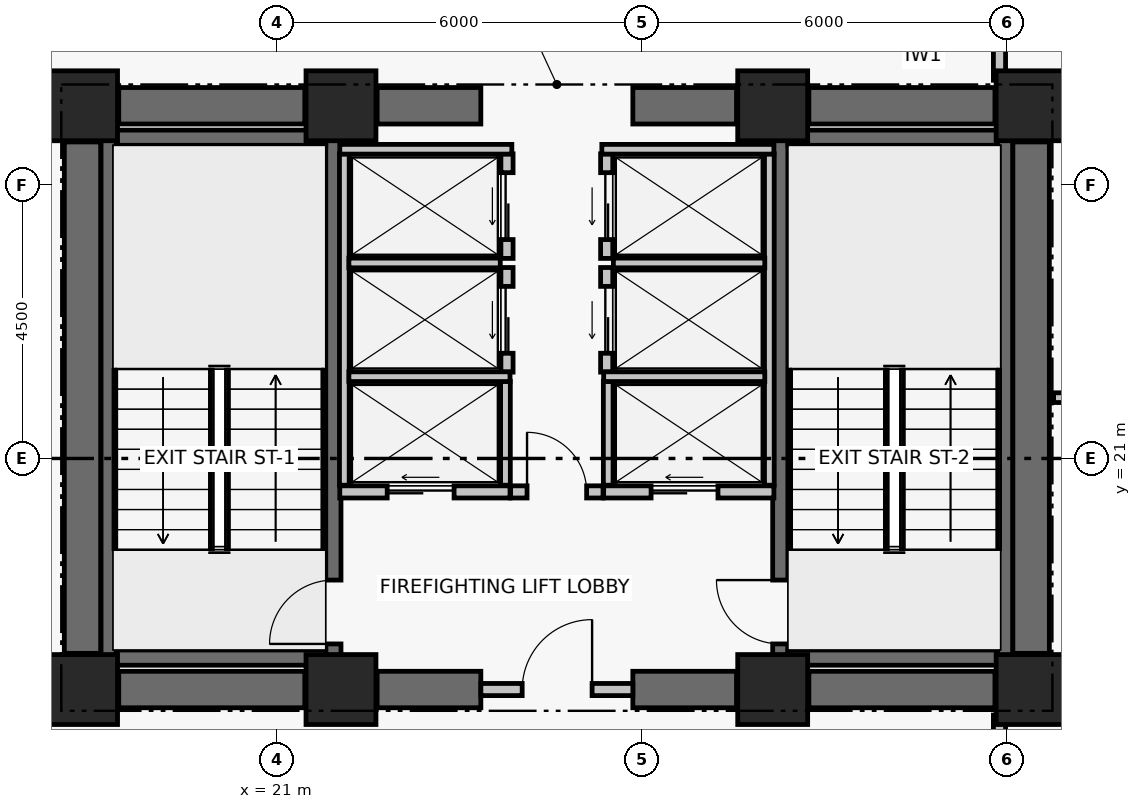
"""IFC4 building model, lengths in metres.
Left out: names, types, materials, properties, quantities, classifications, styles, units other than length and angle.
Written with IfcOpenShell. Run it as: python <this file> out.ifc"""

import sys

from ifc_helpers import new_model, si_unit, direction, frame, frame_2d, origin, origin_2d, place, context, subcontext, project, spatial, rectangle, extrude, element, fill, save


model = new_model("IFC4")
c1 = context("Model", 3, precision=1e-05, world=origin(), true_north=direction((0.0, 1.0)))
c2 = subcontext(c1, "Body", "Model", "MODEL_VIEW")
j1 = project(units=[si_unit("LENGTHUNIT", "METRE"), si_unit("PLANEANGLEUNIT", "RADIAN")], contexts=[c1])
p1 = place(None, origin())
s1 = spatial("IfcSite", under=j1, at=p1, CompositionType="ELEMENT")
p2 = place(p1, origin())
s2 = spatial("IfcBuilding", under=s1, at=p2, CompositionType="ELEMENT")
p3 = place(p2, frame((0.0, 0.0, 83.4)))
s3 = spatial("IfcBuildingStorey", under=s2, at=p3, CompositionType="ELEMENT", Elevation=83.4)
for number, where, z_axis, x_axis in (
    (1, (17.8, 17.2, 0.0), (0.0, 0.0, 1.0), (1.0, 0.0, 0.0)),
    (2, (22.05, 17.2, 0.0), (0.0, 0.0, 1.0), (1.0, 0.0, 0.0)),
    (3, (29.15, 17.2, 0.0), (0.0, 0.0, 1.0), (1.0, 0.0, 0.0)),
    (4, (33.4, 17.2, 0.0), (0.0, 0.0, 1.0), (1.0, 0.0, 0.0)),
    (5, (17.8, 26.8, 0.0), (0.0, 0.0, 1.0), (1.0, 0.0, 0.0)),
    (6, (22.05, 26.8, 0.0), (0.0, 0.0, 1.0), (1.0, 0.0, 0.0)),
    (7, (29.15, 26.8, 0.0), (0.0, 0.0, 1.0), (1.0, 0.0, 0.0)),
    (8, (33.4, 26.8, 0.0), (0.0, 0.0, 1.0), (1.0, 0.0, 0.0)),
):
    element("IfcColumn", number, at=place(p3, frame(where, z_axis=z_axis, x_axis=x_axis)), inside=s3, PredefinedType="COLUMN", context=c2, shape_type="SweptSolid", body=[
        extrude(rectangle(XDim=1.15, YDim=1.15, at=origin_2d()), origin(), (0.0, 0.0, 1.0), 5.7),
    ])
p4 = place(p3, frame((18.395, 17.2, 0.0), z_axis=(0.0, 0.0, 1.0), x_axis=(1.0, 0.0, 0.0)))
e9 = element("IfcWall", 9, at=p4, inside=s3, PredefinedType="SHEAR", context=c2, shape_type="SweptSolid", body=[
    extrude(rectangle(XDim=3.06, YDim=0.6, at=frame_2d((1.53, 0.0))), origin(), (0.0, 0.0, 1.0), 5.45),
])
p5 = place(p3, frame((22.645, 17.2, 0.0), z_axis=(0.0, 0.0, 1.0), x_axis=(1.0, 0.0, 0.0)))
e10 = element("IfcWall", 10, at=p5, inside=s3, PredefinedType="SHEAR", context=c2, shape_type="SweptSolid", body=[
    extrude(rectangle(XDim=1.705, YDim=0.6, at=frame_2d((0.853, 0.0))), origin(), (0.0, 0.0, 1.0), 5.45),
])
p6 = place(p3, frame((26.85, 17.2, 0.0), z_axis=(0.0, 0.0, 1.0), x_axis=(1.0, 0.0, 0.0)))
e11 = element("IfcWall", 11, at=p6, inside=s3, PredefinedType="SHEAR", context=c2, shape_type="SweptSolid", body=[
    extrude(rectangle(XDim=1.705, YDim=0.6, at=frame_2d((0.853, 0.0))), origin(), (0.0, 0.0, 1.0), 5.45),
])
p7 = place(p3, frame((29.745, 17.2, 0.0), z_axis=(0.0, 0.0, 1.0), x_axis=(1.0, 0.0, 0.0)))
e12 = element("IfcWall", 12, at=p7, inside=s3, PredefinedType="SHEAR", context=c2, shape_type="SweptSolid", body=[
    extrude(rectangle(XDim=3.06, YDim=0.6, at=frame_2d((1.53, 0.0))), origin(), (0.0, 0.0, 1.0), 5.45),
])
p8 = place(p3, frame((18.395, 26.8, 0.0), z_axis=(0.0, 0.0, 1.0), x_axis=(1.0, 0.0, 0.0)))
e13 = element("IfcWall", 13, at=p8, inside=s3, PredefinedType="SHEAR", context=c2, shape_type="SweptSolid", body=[
    extrude(rectangle(XDim=3.06, YDim=0.6, at=frame_2d((1.53, 0.0))), origin(), (0.0, 0.0, 1.0), 5.45),
])
p9 = place(p3, frame((22.645, 26.8, 0.0), z_axis=(0.0, 0.0, 1.0), x_axis=(1.0, 0.0, 0.0)))
e14 = element("IfcWall", 14, at=p9, inside=s3, PredefinedType="SHEAR", context=c2, shape_type="SweptSolid", body=[
    extrude(rectangle(XDim=1.705, YDim=0.6, at=frame_2d((0.853, 0.0))), origin(), (0.0, 0.0, 1.0), 5.45),
])
p10 = place(p3, frame((26.85, 26.8, 0.0), z_axis=(0.0, 0.0, 1.0), x_axis=(1.0, 0.0, 0.0)))
e15 = element("IfcWall", 15, at=p10, inside=s3, PredefinedType="SHEAR", context=c2, shape_type="SweptSolid", body=[
    extrude(rectangle(XDim=1.705, YDim=0.6, at=frame_2d((0.853, 0.0))), origin(), (0.0, 0.0, 1.0), 5.45),
])
p11 = place(p3, frame((29.745, 26.8, 0.0), z_axis=(0.0, 0.0, 1.0), x_axis=(1.0, 0.0, 0.0)))
e16 = element("IfcWall", 16, at=p11, inside=s3, PredefinedType="SHEAR", context=c2, shape_type="SweptSolid", body=[
    extrude(rectangle(XDim=3.06, YDim=0.6, at=frame_2d((1.53, 0.0))), origin(), (0.0, 0.0, 1.0), 5.45),
])
for number, where, z_axis, x_axis in (
    (17, (17.8, 17.795, 0.0), (0.0, 0.0, 1.0), (0.0, 1.0, 0.0)),
    (18, (33.4, 17.795, 0.0), (0.0, 0.0, 1.0), (0.0, 1.0, 0.0)),
):
    element("IfcWall", number, at=place(p3, frame(where, z_axis=z_axis, x_axis=x_axis)), inside=s3, PredefinedType="SHEAR", context=c2, shape_type="SweptSolid", body=[
        extrude(rectangle(XDim=8.41, YDim=0.6, at=frame_2d((4.205, 0.0))), origin(), (0.0, 0.0, 1.0), 5.45),
    ])
p12 = place(p3, frame((18.229, 17.6, 0.0), z_axis=(0.0, 0.0, 1.0), x_axis=(0.0, 1.0, 0.0)))
e19 = element("IfcWall", 19, at=p12, inside=s3, PredefinedType="SHEAR", context=c2, shape_type="SweptSolid", body=[
    extrude(rectangle(XDim=8.8, YDim=0.25, at=frame_2d((4.4, 0.0))), origin(), (0.0, 0.0, 1.0), 5.45),
])
p13 = place(p3, frame((21.925, 17.6, 0.0), z_axis=(0.0, 0.0, 1.0), x_axis=(0.0, 1.0, 0.0)))
e20 = element("IfcWall", 20, at=p13, inside=s3, PredefinedType="SHEAR", context=c2, shape_type="SweptSolid", body=[
    extrude(rectangle(XDim=8.8, YDim=0.25, at=frame_2d((4.4, 0.0))), origin(), (0.0, 0.0, 1.0), 5.45),
])
p14 = place(p13, frame((0.35, 0.0, 0.0)))
e21 = element("IfcOpeningElement", 21, at=p14, cuts=e20, PredefinedType="OPENING", context=c2, shape_type="SweptSolid", body=[
    extrude(rectangle(XDim=1.05, YDim=2.08, at=frame_2d((0.525, 1.04))), frame((0.0, 0.135, 0.0), z_axis=(0.0, -1.0, 0.0), x_axis=(1.0, 0.0, 0.0)), (0.0, 0.0, 1.0), 0.27),
])
for number, where, z_axis, x_axis in (
    (22, (18.354, 17.725, 0.0), (0.0, 0.0, 1.0), (1.0, 0.0, 0.0)),
    (23, (18.354, 26.275, 0.0), (0.0, 0.0, 1.0), (1.0, 0.0, 0.0)),
):
    element("IfcWall", number, at=place(p3, frame(where, z_axis=z_axis, x_axis=x_axis)), inside=s3, PredefinedType="SHEAR", context=c2, shape_type="SweptSolid", body=[
        extrude(rectangle(XDim=3.446, YDim=0.25, at=frame_2d((1.723, 0.0))), origin(), (0.0, 0.0, 1.0), 5.45),
    ])
p15 = place(p3, frame((29.275, 17.6, 0.0), z_axis=(0.0, 0.0, 1.0), x_axis=(0.0, 1.0, 0.0)))
e24 = element("IfcWall", 24, at=p15, inside=s3, PredefinedType="SHEAR", context=c2, shape_type="SweptSolid", body=[
    extrude(rectangle(XDim=8.8, YDim=0.25, at=frame_2d((4.4, 0.0))), origin(), (0.0, 0.0, 1.0), 5.45),
])
p16 = place(p15, frame((0.35, 0.0, 0.0)))
e25 = element("IfcOpeningElement", 25, at=p16, cuts=e24, PredefinedType="OPENING", context=c2, shape_type="SweptSolid", body=[
    extrude(rectangle(XDim=1.05, YDim=2.08, at=frame_2d((0.525, 1.04))), frame((0.0, 0.135, 0.0), z_axis=(0.0, -1.0, 0.0), x_axis=(1.0, 0.0, 0.0)), (0.0, 0.0, 1.0), 0.27),
])
p17 = place(p3, frame((32.971, 17.6, 0.0), z_axis=(0.0, 0.0, 1.0), x_axis=(0.0, 1.0, 0.0)))
e26 = element("IfcWall", 26, at=p17, inside=s3, PredefinedType="SHEAR", context=c2, shape_type="SweptSolid", body=[
    extrude(rectangle(XDim=8.8, YDim=0.25, at=frame_2d((4.4, 0.0))), origin(), (0.0, 0.0, 1.0), 5.45),
])
for number, where, z_axis, x_axis in (
    (27, (29.4, 17.725, 0.0), (0.0, 0.0, 1.0), (1.0, 0.0, 0.0)),
    (28, (29.4, 26.275, 0.0), (0.0, 0.0, 1.0), (1.0, 0.0, 0.0)),
):
    element("IfcWall", number, at=place(p3, frame(where, z_axis=z_axis, x_axis=x_axis)), inside=s3, PredefinedType="SHEAR", context=c2, shape_type="SweptSolid", body=[
        extrude(rectangle(XDim=3.446, YDim=0.25, at=frame_2d((1.723, 0.0))), origin(), (0.0, 0.0, 1.0), 5.45),
    ])
p18 = place(p3, frame((24.35, 17.2, 0.0), z_axis=(0.0, 0.0, 1.0), x_axis=(1.0, 0.0, 0.0)))
e29 = element("IfcWall", 29, at=p18, inside=s3, PredefinedType="PARTITIONING", context=c2, shape_type="SweptSolid", body=[
    extrude(rectangle(XDim=2.5, YDim=0.2, at=frame_2d((1.25, 0.0))), origin(), (0.0, 0.0, 1.0), 4.58),
])
p19 = place(p18, frame((0.68, 0.0, 0.0)))
e30 = element("IfcOpeningElement", 30, at=p19, cuts=e29, PredefinedType="OPENING", context=c2, shape_type="SweptSolid", body=[
    extrude(rectangle(XDim=1.15, YDim=2.08, at=frame_2d((0.575, 1.04))), frame((0.0, 0.11, 0.0), z_axis=(0.0, -1.0, 0.0), x_axis=(1.0, 0.0, 0.0)), (0.0, 0.0, 1.0), 0.22),
])
p20 = place(p3, frame((24.84, 20.45, 0.0), z_axis=(0.0, 0.0, 1.0), x_axis=(1.0, 0.0, 0.0)))
e31 = element("IfcWall", 31, at=p20, inside=s3, PredefinedType="PARTITIONING", context=c2, shape_type="SweptSolid", body=[
    extrude(rectangle(XDim=1.52, YDim=0.2, at=frame_2d((0.76, 0.0))), origin(), (0.0, 0.0, 1.0), 5.45),
])
p21 = place(p20, frame((0.27, 0.0, 0.0)))
e32 = element("IfcOpeningElement", 32, at=p21, cuts=e31, PredefinedType="OPENING", context=c2, shape_type="SweptSolid", body=[
    extrude(rectangle(XDim=0.98, YDim=2.06, at=frame_2d((0.49, 1.03))), frame((0.0, 0.11, 0.0), z_axis=(0.0, -1.0, 0.0), x_axis=(1.0, 0.0, 0.0)), (0.0, 0.0, 1.0), 0.22),
])
p22 = place(p3, frame((22.03, 20.45, 0.0), z_axis=(0.0, 0.0, 1.0), x_axis=(1.0, 0.0, 0.0)))
e33 = element("IfcWall", 33, at=p22, inside=s3, PredefinedType="PARTITIONING", context=c2, shape_type="SweptSolid", body=[
    extrude(rectangle(XDim=2.8, YDim=0.2, at=frame_2d((1.4, 0.0))), origin(), (0.0, 0.0, 1.0), 5.45),
])
p23 = place(p22, frame((0.78, 0.0, 0.0)))
e34 = element("IfcOpeningElement", 34, at=p23, cuts=e33, PredefinedType="OPENING", context=c2, shape_type="SweptSolid", body=[
    extrude(rectangle(XDim=1.1, YDim=2.08, at=frame_2d((0.55, 1.04))), frame((0.0, 0.11, 0.0), z_axis=(0.0, -1.0, 0.0), x_axis=(1.0, 0.0, 0.0)), (0.0, 0.0, 1.0), 0.22),
])
p24 = place(p3, frame((26.37, 20.45, 0.0), z_axis=(0.0, 0.0, 1.0), x_axis=(1.0, 0.0, 0.0)))
e35 = element("IfcWall", 35, at=p24, inside=s3, PredefinedType="PARTITIONING", context=c2, shape_type="SweptSolid", body=[
    extrude(rectangle(XDim=2.8, YDim=0.2, at=frame_2d((1.4, 0.0))), origin(), (0.0, 0.0, 1.0), 5.45),
])
p25 = place(p24, frame((0.78, 0.0, 0.0)))
e36 = element("IfcOpeningElement", 36, at=p25, cuts=e35, PredefinedType="OPENING", context=c2, shape_type="SweptSolid", body=[
    extrude(rectangle(XDim=1.1, YDim=2.08, at=frame_2d((0.55, 1.04))), frame((0.0, 0.11, 0.0), z_axis=(0.0, -1.0, 0.0), x_axis=(1.0, 0.0, 0.0)), (0.0, 0.0, 1.0), 0.22),
])
p26 = place(p3, frame((24.78, 22.42, 0.0), z_axis=(0.0, 0.0, 1.0), x_axis=(0.0, 1.0, 0.0)))
e37 = element("IfcWall", 37, at=p26, inside=s3, PredefinedType="PARTITIONING", context=c2, shape_type="SweptSolid", body=[
    extrude(rectangle(XDim=1.72, YDim=0.2, at=frame_2d((0.86, 0.0))), origin(), (0.0, 0.0, 1.0), 5.45),
])
p27 = place(p26, frame((0.31, 0.0, 0.0)))
e38 = element("IfcOpeningElement", 38, at=p27, cuts=e37, PredefinedType="OPENING", context=c2, shape_type="SweptSolid", body=[
    extrude(rectangle(XDim=1.1, YDim=2.08, at=frame_2d((0.55, 1.04))), frame((0.0, 0.11, 0.0), z_axis=(0.0, -1.0, 0.0), x_axis=(1.0, 0.0, 0.0)), (0.0, 0.0, 1.0), 0.22),
])
p28 = place(p3, frame((24.78, 24.29, 0.0), z_axis=(0.0, 0.0, 1.0), x_axis=(0.0, 1.0, 0.0)))
e39 = element("IfcWall", 39, at=p28, inside=s3, PredefinedType="PARTITIONING", context=c2, shape_type="SweptSolid", body=[
    extrude(rectangle(XDim=1.72, YDim=0.2, at=frame_2d((0.86, 0.0))), origin(), (0.0, 0.0, 1.0), 5.45),
])
p29 = place(p28, frame((0.31, 0.0, 0.0)))
e40 = element("IfcOpeningElement", 40, at=p29, cuts=e39, PredefinedType="OPENING", context=c2, shape_type="SweptSolid", body=[
    extrude(rectangle(XDim=1.1, YDim=2.08, at=frame_2d((0.55, 1.04))), frame((0.0, 0.11, 0.0), z_axis=(0.0, -1.0, 0.0), x_axis=(1.0, 0.0, 0.0)), (0.0, 0.0, 1.0), 0.22),
])
p30 = place(p3, frame((26.42, 22.42, 0.0), z_axis=(0.0, 0.0, 1.0), x_axis=(0.0, 1.0, 0.0)))
e41 = element("IfcWall", 41, at=p30, inside=s3, PredefinedType="PARTITIONING", context=c2, shape_type="SweptSolid", body=[
    extrude(rectangle(XDim=1.72, YDim=0.2, at=frame_2d((0.86, 0.0))), origin(), (0.0, 0.0, 1.0), 5.45),
])
p31 = place(p30, frame((0.31, 0.0, 0.0)))
e42 = element("IfcOpeningElement", 42, at=p31, cuts=e41, PredefinedType="OPENING", context=c2, shape_type="SweptSolid", body=[
    extrude(rectangle(XDim=1.1, YDim=2.08, at=frame_2d((0.55, 1.04))), frame((0.0, 0.11, 0.0), z_axis=(0.0, -1.0, 0.0), x_axis=(1.0, 0.0, 0.0)), (0.0, 0.0, 1.0), 0.22),
])
p32 = place(p3, frame((26.42, 24.29, 0.0), z_axis=(0.0, 0.0, 1.0), x_axis=(0.0, 1.0, 0.0)))
e43 = element("IfcWall", 43, at=p32, inside=s3, PredefinedType="PARTITIONING", context=c2, shape_type="SweptSolid", body=[
    extrude(rectangle(XDim=1.72, YDim=0.2, at=frame_2d((0.86, 0.0))), origin(), (0.0, 0.0, 1.0), 5.45),
])
p33 = place(p32, frame((0.31, 0.0, 0.0)))
e44 = element("IfcOpeningElement", 44, at=p33, cuts=e43, PredefinedType="OPENING", context=c2, shape_type="SweptSolid", body=[
    extrude(rectangle(XDim=1.1, YDim=2.08, at=frame_2d((0.55, 1.04))), frame((0.0, 0.11, 0.0), z_axis=(0.0, -1.0, 0.0), x_axis=(1.0, 0.0, 0.0)), (0.0, 0.0, 1.0), 0.22),
])
p34 = place(p3, frame((22.105, 20.56, 0.0), z_axis=(0.0, 0.0, 1.0), x_axis=(0.0, 1.0, 0.0)))
e45 = element("IfcWall", 45, at=p34, inside=s3, PredefinedType="PARTITIONING", context=c2, shape_type="SweptSolid", body=[
    extrude(rectangle(XDim=5.45, YDim=0.16, at=frame_2d((2.725, 0.0))), origin(), (0.0, 0.0, 1.0), 5.45),
])
p35 = place(p3, frame((24.755, 20.56, 0.0), z_axis=(0.0, 0.0, 1.0), x_axis=(0.0, 1.0, 0.0)))
e46 = element("IfcWall", 46, at=p35, inside=s3, PredefinedType="PARTITIONING", context=c2, shape_type="SweptSolid", body=[
    extrude(rectangle(XDim=1.71, YDim=0.16, at=frame_2d((0.855, 0.0))), origin(), (0.0, 0.0, 1.0), 5.45),
])
p36 = place(p3, frame((22.18, 22.345, 0.0), z_axis=(0.0, 0.0, 1.0), x_axis=(1.0, 0.0, 0.0)))
e47 = element("IfcWall", 47, at=p36, inside=s3, PredefinedType="PARTITIONING", context=c2, shape_type="SweptSolid", body=[
    extrude(rectangle(XDim=2.65, YDim=0.16, at=frame_2d((1.325, 0.0))), origin(), (0.0, 0.0, 1.0), 5.45),
])
p37 = place(p3, frame((22.18, 24.215, 0.0), z_axis=(0.0, 0.0, 1.0), x_axis=(1.0, 0.0, 0.0)))
e48 = element("IfcWall", 48, at=p37, inside=s3, PredefinedType="PARTITIONING", context=c2, shape_type="SweptSolid", body=[
    extrude(rectangle(XDim=2.49, YDim=0.16, at=frame_2d((1.245, 0.0))), origin(), (0.0, 0.0, 1.0), 5.45),
])
p38 = place(p3, frame((22.03, 26.085, 0.0), z_axis=(0.0, 0.0, 1.0), x_axis=(1.0, 0.0, 0.0)))
e49 = element("IfcWall", 49, at=p38, inside=s3, PredefinedType="PARTITIONING", context=c2, shape_type="SweptSolid", body=[
    extrude(rectangle(XDim=2.83, YDim=0.16, at=frame_2d((1.415, 0.0))), origin(), (0.0, 0.0, 1.0), 5.45),
])
p39 = place(p3, frame((29.095, 20.56, 0.0), z_axis=(0.0, 0.0, 1.0), x_axis=(0.0, 1.0, 0.0)))
e50 = element("IfcWall", 50, at=p39, inside=s3, PredefinedType="PARTITIONING", context=c2, shape_type="SweptSolid", body=[
    extrude(rectangle(XDim=5.45, YDim=0.16, at=frame_2d((2.725, 0.0))), origin(), (0.0, 0.0, 1.0), 5.45),
])
p40 = place(p3, frame((26.445, 20.56, 0.0), z_axis=(0.0, 0.0, 1.0), x_axis=(0.0, 1.0, 0.0)))
e51 = element("IfcWall", 51, at=p40, inside=s3, PredefinedType="PARTITIONING", context=c2, shape_type="SweptSolid", body=[
    extrude(rectangle(XDim=1.71, YDim=0.16, at=frame_2d((0.855, 0.0))), origin(), (0.0, 0.0, 1.0), 5.45),
])
p41 = place(p3, frame((26.37, 22.345, 0.0), z_axis=(0.0, 0.0, 1.0), x_axis=(1.0, 0.0, 0.0)))
e52 = element("IfcWall", 52, at=p41, inside=s3, PredefinedType="PARTITIONING", context=c2, shape_type="SweptSolid", body=[
    extrude(rectangle(XDim=2.65, YDim=0.16, at=frame_2d((1.325, 0.0))), origin(), (0.0, 0.0, 1.0), 5.45),
])
p42 = place(p3, frame((26.53, 24.215, 0.0), z_axis=(0.0, 0.0, 1.0), x_axis=(1.0, 0.0, 0.0)))
e53 = element("IfcWall", 53, at=p42, inside=s3, PredefinedType="PARTITIONING", context=c2, shape_type="SweptSolid", body=[
    extrude(rectangle(XDim=2.49, YDim=0.16, at=frame_2d((1.245, 0.0))), origin(), (0.0, 0.0, 1.0), 5.45),
])
p43 = place(p3, frame((26.34, 26.085, 0.0), z_axis=(0.0, 0.0, 1.0), x_axis=(1.0, 0.0, 0.0)))
e54 = element("IfcWall", 54, at=p43, inside=s3, PredefinedType="PARTITIONING", context=c2, shape_type="SweptSolid", body=[
    extrude(rectangle(XDim=2.83, YDim=0.16, at=frame_2d((1.415, 0.0))), origin(), (0.0, 0.0, 1.0), 5.45),
])
p44 = place(p3, frame((32.88, 16.109, 0.0), z_axis=(0.0, 0.0, 1.0), x_axis=(0.0, 1.0, 0.0)))
e55 = element("IfcWall", 55, at=p44, inside=s3, PredefinedType="PARTITIONING", context=c2, shape_type="SweptSolid", body=[
    extrude(rectangle(XDim=0.671, YDim=0.2, at=frame_2d((0.335, 0.0))), origin(), (0.0, 0.0, 1.0), 4.58),
])
for number, where, z_axis, x_axis in (
    (56, (32.88, 16.78, 0.0), (0.0, 0.0, 1.0), (1.0, 0.0, 0.0)),
    (57, (33.74, 27.22, 0.0), (0.0, 0.0, 1.0), (-1.0, 0.0, 0.0)),
):
    element("IfcWall", number, at=place(p3, frame(where, z_axis=z_axis, x_axis=x_axis)), inside=s3, PredefinedType="PARTITIONING", context=c2, shape_type="SweptSolid", body=[
        extrude(rectangle(XDim=0.86, YDim=0.2, at=frame_2d((0.43, 0.0))), origin(), (0.0, 0.0, 1.0), 4.03),
    ])
p45 = place(p3, frame((32.88, 27.22, 0.0), z_axis=(0.0, 0.0, 1.0), x_axis=(0.0, 1.0, 0.0)))
e58 = element("IfcWall", 58, at=p45, inside=s3, PredefinedType="PARTITIONING", context=c2, shape_type="SweptSolid", body=[
    extrude(rectangle(XDim=0.889, YDim=0.2, at=frame_2d((0.444, 0.0))), origin(), (0.0, 0.0, 1.0), 4.58),
])
p46 = place(p3, frame((33.77, 22.0, 0.0), z_axis=(0.0, 0.0, 1.0), x_axis=(1.0, 0.0, 0.0)))
e59 = element("IfcWall", 59, at=p46, inside=s3, PredefinedType="PARTITIONING", context=c2, shape_type="SweptSolid", body=[
    extrude(rectangle(XDim=9.052, YDim=0.16, at=frame_2d((4.526, 0.0))), origin(), (0.0, 0.0, 1.0), 4.03),
])
p47 = place(p14, origin())
e60 = element("IfcDoor", 60, at=p47, inside=s3, OperationType="SINGLE_SWING_LEFT", PredefinedType="DOOR", context=c2, shape_type="SweptSolid", body=[
    extrude(rectangle(XDim=1.05, YDim=2.08, at=frame_2d((0.525, 1.04))), frame((0.0, 0.025, 0.0), z_axis=(0.0, -1.0, 0.0), x_axis=(1.0, 0.0, 0.0)), (0.0, 0.0, 1.0), 0.05),
])
fill(e21, e60)
p48 = place(p16, origin())
e61 = element("IfcDoor", 61, at=p48, inside=s3, OperationType="SINGLE_SWING_RIGHT", PredefinedType="DOOR", context=c2, shape_type="SweptSolid", body=[
    extrude(rectangle(XDim=1.05, YDim=2.08, at=frame_2d((0.525, 1.04))), frame((0.0, 0.025, 0.0), z_axis=(0.0, -1.0, 0.0), x_axis=(1.0, 0.0, 0.0)), (0.0, 0.0, 1.0), 0.05),
])
fill(e25, e61)
p49 = place(p19, origin())
e62 = element("IfcDoor", 62, at=p49, inside=s3, OperationType="SINGLE_SWING_RIGHT", PredefinedType="DOOR", context=c2, shape_type="SweptSolid", body=[
    extrude(rectangle(XDim=1.15, YDim=2.08, at=frame_2d((0.575, 1.04))), frame((0.0, 0.025, 0.0), z_axis=(0.0, -1.0, 0.0), x_axis=(1.0, 0.0, 0.0)), (0.0, 0.0, 1.0), 0.05),
])
fill(e30, e62)
p50 = place(p21, origin())
e63 = element("IfcDoor", 63, at=p50, inside=s3, OperationType="SINGLE_SWING_LEFT", PredefinedType="DOOR", context=c2, shape_type="SweptSolid", body=[
    extrude(rectangle(XDim=0.98, YDim=2.06, at=frame_2d((0.49, 1.03))), frame((0.0, 0.025, 0.0), z_axis=(0.0, -1.0, 0.0), x_axis=(1.0, 0.0, 0.0)), (0.0, 0.0, 1.0), 0.05),
])
fill(e32, e63)
p51 = place(p23, origin())
e64 = element("IfcDoor", 64, at=p51, inside=s3, OperationType="DOUBLE_DOOR_SLIDING", PredefinedType="DOOR", context=c2, shape_type="SweptSolid", body=[
    extrude(rectangle(XDim=1.1, YDim=2.08, at=frame_2d((0.55, 1.04))), frame((0.0, 0.025, 0.0), z_axis=(0.0, -1.0, 0.0), x_axis=(1.0, 0.0, 0.0)), (0.0, 0.0, 1.0), 0.05),
])
fill(e34, e64)
p52 = place(p25, origin())
e65 = element("IfcDoor", 65, at=p52, inside=s3, OperationType="DOUBLE_DOOR_SLIDING", PredefinedType="DOOR", context=c2, shape_type="SweptSolid", body=[
    extrude(rectangle(XDim=1.1, YDim=2.08, at=frame_2d((0.55, 1.04))), frame((0.0, 0.025, 0.0), z_axis=(0.0, -1.0, 0.0), x_axis=(1.0, 0.0, 0.0)), (0.0, 0.0, 1.0), 0.05),
])
fill(e36, e65)
p53 = place(p27, origin())
e66 = element("IfcDoor", 66, at=p53, inside=s3, OperationType="DOUBLE_DOOR_SLIDING", PredefinedType="DOOR", context=c2, shape_type="SweptSolid", body=[
    extrude(rectangle(XDim=1.1, YDim=2.08, at=frame_2d((0.55, 1.04))), frame((0.0, 0.025, 0.0), z_axis=(0.0, -1.0, 0.0), x_axis=(1.0, 0.0, 0.0)), (0.0, 0.0, 1.0), 0.05),
])
fill(e38, e66)
p54 = place(p29, origin())
e67 = element("IfcDoor", 67, at=p54, inside=s3, OperationType="DOUBLE_DOOR_SLIDING", PredefinedType="DOOR", context=c2, shape_type="SweptSolid", body=[
    extrude(rectangle(XDim=1.1, YDim=2.08, at=frame_2d((0.55, 1.04))), frame((0.0, 0.025, 0.0), z_axis=(0.0, -1.0, 0.0), x_axis=(1.0, 0.0, 0.0)), (0.0, 0.0, 1.0), 0.05),
])
fill(e40, e67)
p55 = place(p31, origin())
e68 = element("IfcDoor", 68, at=p55, inside=s3, OperationType="DOUBLE_DOOR_SLIDING", PredefinedType="DOOR", context=c2, shape_type="SweptSolid", body=[
    extrude(rectangle(XDim=1.1, YDim=2.08, at=frame_2d((0.55, 1.04))), frame((0.0, 0.025, 0.0), z_axis=(0.0, -1.0, 0.0), x_axis=(1.0, 0.0, 0.0)), (0.0, 0.0, 1.0), 0.05),
])
fill(e42, e68)
p56 = place(p33, origin())
e69 = element("IfcDoor", 69, at=p56, inside=s3, OperationType="DOUBLE_DOOR_SLIDING", PredefinedType="DOOR", context=c2, shape_type="SweptSolid", body=[
    extrude(rectangle(XDim=1.1, YDim=2.08, at=frame_2d((0.55, 1.04))), frame((0.0, 0.025, 0.0), z_axis=(0.0, -1.0, 0.0), x_axis=(1.0, 0.0, 0.0)), (0.0, 0.0, 1.0), 0.05),
])
fill(e44, e69)
save(model, sys.argv[1])
